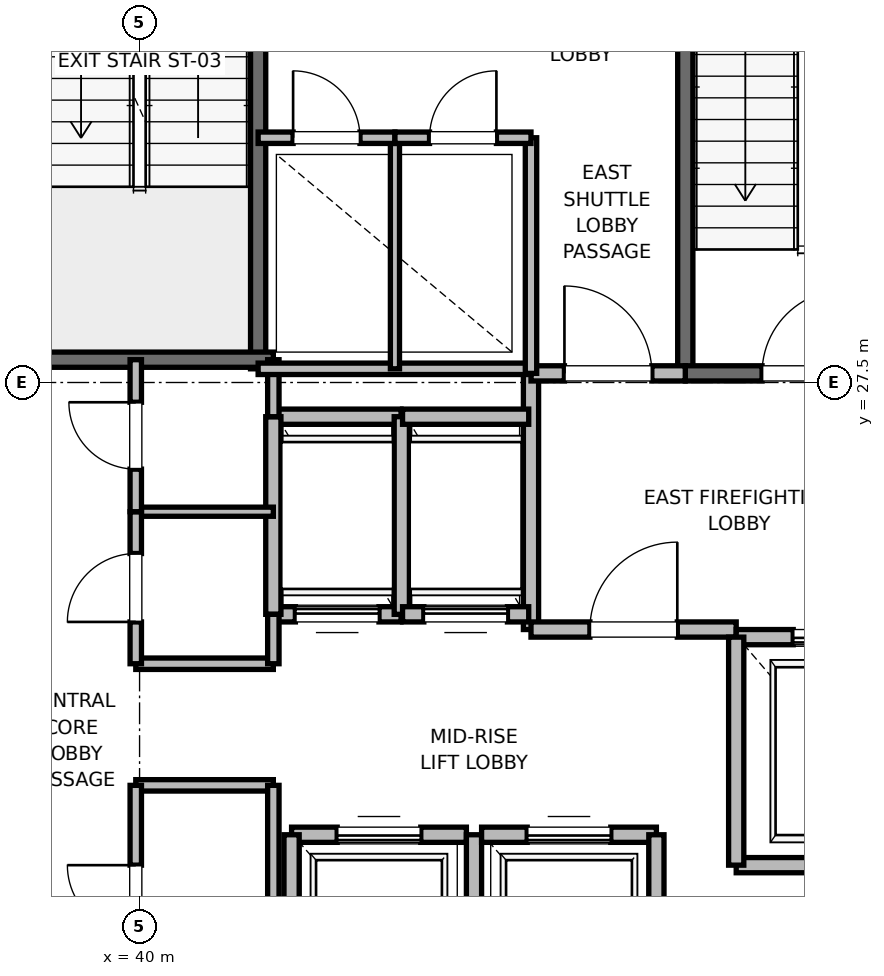
"""IFC4 building model, lengths in metres.
Left out: names, types, materials, properties, quantities, classifications, styles, units other than length and angle.
Written with IfcOpenShell. Run it as: python <this file> out.ifc"""

import sys

from ifc_helpers import new_model, si_unit, direction, frame, frame_2d, origin, place, context, subcontext, project, spatial, rectangle, extrude, element, fill, save


model = new_model("IFC4")
c1 = context("Model", 3, precision=1e-05, world=origin(), true_north=direction((0.0, 1.0)))
c2 = subcontext(c1, "Body", "Model", "MODEL_VIEW")
j1 = project(units=[si_unit("LENGTHUNIT", "METRE"), si_unit("PLANEANGLEUNIT", "RADIAN")], contexts=[c1])
p1 = place(None, origin())
s1 = spatial("IfcSite", under=j1, at=p1, CompositionType="ELEMENT")
p2 = place(p1, origin())
s2 = spatial("IfcBuilding", under=s1, at=p2, CompositionType="ELEMENT")
p3 = place(p2, frame((0.0, 0.0, 189.4)))
s3 = spatial("IfcBuildingStorey", under=s2, at=p3, CompositionType="ELEMENT", Elevation=189.4)
p4 = place(p3, frame((47.18, 27.62, 0.0), z_axis=(0.0, 0.0, 1.0), x_axis=(0.0, 1.0, 0.0)))
e1 = element("IfcWall", 1, at=p4, inside=s3, PredefinedType="SOLIDWALL", context=c2, shape_type="SweptSolid", body=[
    extrude(rectangle(XDim=8.18, YDim=0.2, at=frame_2d((4.09, 0.0))), origin(), (0.0, 0.0, 1.0), 5.1),
])
p5 = place(p3, frame((47.18, 27.62, 0.0), z_axis=(0.0, 0.0, 1.0), x_axis=(1.0, 0.0, 0.0)))
e2 = element("IfcWall", 2, at=p5, inside=s3, PredefinedType="SOLIDWALL", context=c2, shape_type="SweptSolid", body=[
    extrude(rectangle(XDim=3.12, YDim=0.2, at=frame_2d((1.56, 0.0))), origin(), (0.0, 0.0, 1.0), 5.1),
])
p6 = place(p5, frame((1.01, 0.0, 0.0)))
e3 = element("IfcOpeningElement", 3, at=p6, cuts=e2, PredefinedType="OPENING", context=c2, shape_type="SweptSolid", body=[
    extrude(rectangle(XDim=1.1, YDim=2.15, at=frame_2d((0.55, 1.075))), frame((0.0, 0.1, 0.0), z_axis=(0.0, -1.0, 0.0), x_axis=(1.0, 0.0, 0.0)), (0.0, 0.0, 1.0), 0.2),
])
p7 = place(p3, frame((41.56, 27.68, 0.0), z_axis=(0.0, 0.0, 1.0), x_axis=(0.0, 1.0, 0.0)))
e4 = element("IfcWall", 4, at=p7, inside=s3, PredefinedType="SOLIDWALL", context=c2, shape_type="SweptSolid", body=[
    extrude(rectangle(XDim=8.57, YDim=0.2, at=frame_2d((4.285, 0.0))), origin(), (0.0, 0.0, 1.0), 5.1),
])
p8 = place(p3, frame((38.44, 27.8, 0.0), z_axis=(0.0, 0.0, 1.0), x_axis=(1.0, 0.0, 0.0)))
e5 = element("IfcWall", 5, at=p8, inside=s3, PredefinedType="SOLIDWALL", context=c2, shape_type="SweptSolid", body=[
    extrude(rectangle(XDim=3.32, YDim=0.2, at=frame_2d((1.66, 0.0))), origin(), (0.0, 0.0, 1.0), 5.1),
])
p9 = place(p3, frame((45.15, 24.25, 0.0), z_axis=(0.0, 0.0, 1.0), x_axis=(0.0, 1.0, 0.0)))
e6 = element("IfcWall", 6, at=p9, inside=s3, PredefinedType="PARTITIONING", context=c2, shape_type="SweptSolid", body=[
    extrude(rectangle(XDim=3.37, YDim=0.2, at=frame_2d((1.685, 0.0))), origin(), (0.0, 0.0, 1.0), 5.1),
])
p10 = place(p3, frame((45.15, 24.25, 0.0), z_axis=(0.0, 0.0, 1.0), x_axis=(1.0, 0.0, 0.0)))
e7 = element("IfcWall", 7, at=p10, inside=s3, PredefinedType="PARTITIONING", context=c2, shape_type="SweptSolid", body=[
    extrude(rectangle(XDim=2.7, YDim=0.2, at=frame_2d((1.35, 0.0))), origin(), (0.0, 0.0, 1.0), 5.1),
])
p11 = place(p10, frame((0.775, 0.0, 0.0)))
e8 = element("IfcOpeningElement", 8, at=p11, cuts=e7, PredefinedType="OPENING", context=c2, shape_type="SweptSolid", body=[
    extrude(rectangle(XDim=1.15, YDim=2.2, at=frame_2d((0.575, 1.1))), frame((0.0, 0.1, 0.0), z_axis=(0.0, -1.0, 0.0), x_axis=(1.0, 0.0, 0.0)), (0.0, 0.0, 1.0), 0.2),
])
p12 = place(p3, frame((45.15, 27.62, 0.0), z_axis=(0.0, 0.0, 1.0), x_axis=(1.0, 0.0, 0.0)))
e9 = element("IfcWall", 9, at=p12, inside=s3, PredefinedType="PARTITIONING", context=c2, shape_type="SweptSolid", body=[
    extrude(rectangle(XDim=2.03, YDim=0.2, at=frame_2d((1.015, 0.0))), origin(), (0.0, 0.0, 1.0), 5.1),
])
p13 = place(p12, frame((0.44, 0.0, 0.0)))
e10 = element("IfcOpeningElement", 10, at=p13, cuts=e9, PredefinedType="OPENING", context=c2, shape_type="SweptSolid", body=[
    extrude(rectangle(XDim=1.15, YDim=2.2, at=frame_2d((0.575, 1.1))), frame((0.0, 0.1, 0.0), z_axis=(0.0, -1.0, 0.0), x_axis=(1.0, 0.0, 0.0)), (0.0, 0.0, 1.0), 0.2),
])
p14 = place(p3, frame((47.85, 21.15, 0.0), z_axis=(0.0, 0.0, 1.0), x_axis=(1.0, 0.0, 0.0)))
e11 = element("IfcWall", 11, at=p14, inside=s3, PredefinedType="SOLIDWALL", context=c2, shape_type="SweptSolid", body=[
    extrude(rectangle(XDim=2.6, YDim=0.2, at=frame_2d((1.3, 0.0))), origin(), (0.0, 0.0, 1.0), 5.1),
])
p15 = place(p3, frame((50.45, 24.15, 0.0), z_axis=(0.0, 0.0, 1.0), x_axis=(-1.0, 0.0, 0.0)))
e12 = element("IfcWall", 12, at=p15, inside=s3, PredefinedType="SOLIDWALL", context=c2, shape_type="SweptSolid", body=[
    extrude(rectangle(XDim=2.6, YDim=0.2, at=frame_2d((1.3, 0.0))), origin(), (0.0, 0.0, 1.0), 4.08),
])
p16 = place(p15, frame((0.75, 0.0, 0.0)))
e13 = element("IfcOpeningElement", 13, at=p16, cuts=e12, PredefinedType="OPENING", context=c2, shape_type="SweptSolid", body=[
    extrude(rectangle(XDim=1.1, YDim=2.2, at=frame_2d((0.55, 1.1))), frame((0.0, 0.1, 0.0), z_axis=(0.0, -1.0, 0.0), x_axis=(1.0, 0.0, 0.0)), (0.0, 0.0, 1.0), 0.2),
])
p17 = place(p3, frame((47.85, 24.15, 0.0), z_axis=(0.0, 0.0, 1.0), x_axis=(0.0, -1.0, 0.0)))
e14 = element("IfcWall", 14, at=p17, inside=s3, PredefinedType="SOLIDWALL", context=c2, shape_type="SweptSolid", body=[
    extrude(rectangle(XDim=3.0, YDim=0.2, at=frame_2d((1.5, 0.0))), origin(), (0.0, 0.0, 1.0), 5.1),
])
p18 = place(p3, frame((44.3, 21.55, 0.0), z_axis=(0.0, 0.0, 1.0), x_axis=(-1.0, 0.0, 0.0)))
e15 = element("IfcWall", 15, at=p18, inside=s3, PredefinedType="SOLIDWALL", context=c2, shape_type="SweptSolid", body=[
    extrude(rectangle(XDim=2.3, YDim=0.2, at=frame_2d((1.15, 0.0))), origin(), (0.0, 0.0, 1.0), 5.1),
])
p19 = place(p18, frame((0.6, 0.0, 0.0)))
e16 = element("IfcOpeningElement", 16, at=p19, cuts=e15, PredefinedType="OPENING", context=c2, shape_type="SweptSolid", body=[
    extrude(rectangle(XDim=1.1, YDim=2.2, at=frame_2d((0.55, 1.1))), frame((0.0, 0.1, 0.0), z_axis=(0.0, -1.0, 0.0), x_axis=(1.0, 0.0, 0.0)), (0.0, 0.0, 1.0), 0.2),
])
p20 = place(p3, frame((42.0, 21.55, 0.0), z_axis=(0.0, 0.0, 1.0), x_axis=(0.0, -1.0, 0.0)))
e17 = element("IfcWall", 17, at=p20, inside=s3, PredefinedType="SOLIDWALL", context=c2, shape_type="SweptSolid", body=[
    extrude(rectangle(XDim=2.6, YDim=0.2, at=frame_2d((1.3, 0.0))), origin(), (0.0, 0.0, 1.0), 4.08),
])
p21 = place(p3, frame((44.4, 18.95, 0.0), z_axis=(0.0, 0.0, 1.0), x_axis=(0.0, 1.0, 0.0)))
e18 = element("IfcWall", 18, at=p21, inside=s3, PredefinedType="SOLIDWALL", context=c2, shape_type="SweptSolid", body=[
    extrude(rectangle(XDim=2.6, YDim=0.2, at=frame_2d((1.3, 0.0))), origin(), (0.0, 0.0, 1.0), 5.1),
])
p22 = place(p3, frame((46.8, 21.55, 0.0), z_axis=(0.0, 0.0, 1.0), x_axis=(-1.0, 0.0, 0.0)))
e19 = element("IfcWall", 19, at=p22, inside=s3, PredefinedType="SOLIDWALL", context=c2, shape_type="SweptSolid", body=[
    extrude(rectangle(XDim=2.3, YDim=0.2, at=frame_2d((1.15, 0.0))), origin(), (0.0, 0.0, 1.0), 5.1),
])
p23 = place(p22, frame((0.6, 0.0, 0.0)))
e20 = element("IfcOpeningElement", 20, at=p23, cuts=e19, PredefinedType="OPENING", context=c2, shape_type="SweptSolid", body=[
    extrude(rectangle(XDim=1.1, YDim=2.2, at=frame_2d((0.55, 1.1))), frame((0.0, 0.1, 0.0), z_axis=(0.0, -1.0, 0.0), x_axis=(1.0, 0.0, 0.0)), (0.0, 0.0, 1.0), 0.2),
])
p24 = place(p3, frame((46.8, 18.95, 0.0), z_axis=(0.0, 0.0, 1.0), x_axis=(0.0, 1.0, 0.0)))
e21 = element("IfcWall", 21, at=p24, inside=s3, PredefinedType="SOLIDWALL", context=c2, shape_type="SweptSolid", body=[
    extrude(rectangle(XDim=2.6, YDim=0.2, at=frame_2d((1.3, 0.0))), origin(), (0.0, 0.0, 1.0), 5.1),
])
p25 = place(p3, frame((41.76, 24.45, 0.0), z_axis=(0.0, 0.0, 1.0), x_axis=(1.0, 0.0, 0.0)))
e22 = element("IfcWall", 22, at=p25, inside=s3, PredefinedType="SOLIDWALL", context=c2, shape_type="SweptSolid", body=[
    extrude(rectangle(XDim=1.68, YDim=0.2, at=frame_2d((0.84, 0.0))), origin(), (0.0, 0.0, 1.0), 5.1),
])
p26 = place(p25, frame((0.29, 0.0, 0.0)))
e23 = element("IfcOpeningElement", 23, at=p26, cuts=e22, PredefinedType="OPENING", context=c2, shape_type="SweptSolid", body=[
    extrude(rectangle(XDim=1.1, YDim=2.2, at=frame_2d((0.55, 1.1))), frame((0.0, 0.1, 0.0), z_axis=(0.0, -1.0, 0.0), x_axis=(1.0, 0.0, 0.0)), (0.0, 0.0, 1.0), 0.2),
])
p27 = place(p3, frame((43.44, 27.05, 0.0), z_axis=(0.0, 0.0, 1.0), x_axis=(-1.0, 0.0, 0.0)))
e24 = element("IfcWall", 24, at=p27, inside=s3, PredefinedType="SOLIDWALL", context=c2, shape_type="SweptSolid", body=[
    extrude(rectangle(XDim=1.68, YDim=0.2, at=frame_2d((0.84, 0.0))), origin(), (0.0, 0.0, 1.0), 5.1),
])
for number, where, z_axis, x_axis in (
    (25, (41.76, 27.05, 0.0), (0.0, 0.0, 1.0), (0.0, -1.0, 0.0)),
    (26, (43.45, 24.45, 0.0), (0.0, 0.0, 1.0), (0.0, 1.0, 0.0)),
):
    element("IfcWall", number, at=place(p3, frame(where, z_axis=z_axis, x_axis=x_axis)), inside=s3, PredefinedType="SOLIDWALL", context=c2, shape_type="SweptSolid", body=[
        extrude(rectangle(XDim=2.6, YDim=0.2, at=frame_2d((1.3, 0.0))), origin(), (0.0, 0.0, 1.0), 5.1),
    ])
p28 = place(p3, frame((43.46, 24.45, 0.0), z_axis=(0.0, 0.0, 1.0), x_axis=(1.0, 0.0, 0.0)))
e27 = element("IfcWall", 27, at=p28, inside=s3, PredefinedType="SOLIDWALL", context=c2, shape_type="SweptSolid", body=[
    extrude(rectangle(XDim=1.66, YDim=0.2, at=frame_2d((0.83, 0.0))), origin(), (0.0, 0.0, 1.0), 5.1),
])
p29 = place(p28, frame((0.28, 0.0, 0.0)))
e28 = element("IfcOpeningElement", 28, at=p29, cuts=e27, PredefinedType="OPENING", context=c2, shape_type="SweptSolid", body=[
    extrude(rectangle(XDim=1.1, YDim=2.2, at=frame_2d((0.55, 1.1))), frame((0.0, 0.1, 0.0), z_axis=(0.0, -1.0, 0.0), x_axis=(1.0, 0.0, 0.0)), (0.0, 0.0, 1.0), 0.2),
])
p30 = place(p3, frame((45.12, 27.05, 0.0), z_axis=(0.0, 0.0, 1.0), x_axis=(-1.0, 0.0, 0.0)))
e29 = element("IfcWall", 29, at=p30, inside=s3, PredefinedType="SOLIDWALL", context=c2, shape_type="SweptSolid", body=[
    extrude(rectangle(XDim=1.66, YDim=0.2, at=frame_2d((0.83, 0.0))), origin(), (0.0, 0.0, 1.0), 5.1),
])
for number, where, z_axis, x_axis in (
    (30, (39.95, 22.2, 0.0), (0.0, 0.0, 1.0), (1.0, 0.0, 0.0)),
    (31, (39.95, 23.8, 0.0), (0.0, 0.0, 1.0), (1.0, 0.0, 0.0)),
):
    element("IfcWall", number, at=place(p3, frame(where, z_axis=z_axis, x_axis=x_axis)), inside=s3, PredefinedType="PARTITIONING", context=c2, shape_type="SweptSolid", body=[
        extrude(rectangle(XDim=1.81, YDim=0.15, at=frame_2d((0.905, 0.0))), origin(), (0.0, 0.0, 1.0), 2.85),
    ])
p31 = place(p3, frame((39.95, 25.8, 0.0), z_axis=(0.0, 0.0, 1.0), x_axis=(1.0, 0.0, 0.0)))
e32 = element("IfcWall", 32, at=p31, inside=s3, PredefinedType="PARTITIONING", context=c2, shape_type="SweptSolid", body=[
    extrude(rectangle(XDim=1.81, YDim=0.12, at=frame_2d((0.905, 0.0))), origin(), (0.0, 0.0, 1.0), 2.85),
])
p32 = place(p3, frame((41.76, 18.6, 0.0), z_axis=(0.0, 0.0, 1.0), x_axis=(0.0, 1.0, 0.0)))
e33 = element("IfcWall", 33, at=p32, inside=s3, PredefinedType="PARTITIONING", context=c2, shape_type="SweptSolid", body=[
    extrude(rectangle(XDim=3.6, YDim=0.15, at=frame_2d((1.8, 0.0))), origin(), (0.0, 0.0, 1.0), 2.85),
])
p33 = place(p3, frame((41.76, 23.8, 0.0), z_axis=(0.0, 0.0, 1.0), x_axis=(0.0, 1.0, 0.0)))
e34 = element("IfcWall", 34, at=p33, inside=s3, PredefinedType="PARTITIONING", context=c2, shape_type="SweptSolid", body=[
    extrude(rectangle(XDim=0.65, YDim=0.15, at=frame_2d((0.325, 0.0))), origin(), (0.0, 0.0, 1.0), 2.85),
])
p34 = place(p3, frame((41.76, 27.05, 0.0), z_axis=(0.0, 0.0, 1.0), x_axis=(0.0, 1.0, 0.0)))
e35 = element("IfcWall", 35, at=p34, inside=s3, PredefinedType="PARTITIONING", context=c2, shape_type="SweptSolid", body=[
    extrude(rectangle(XDim=0.75, YDim=0.15, at=frame_2d((0.375, 0.0))), origin(), (0.0, 0.0, 1.0), 2.85),
])
p35 = place(p3, frame((39.95, 19.2, 0.0), z_axis=(0.0, 0.0, 1.0), x_axis=(0.0, 1.0, 0.0)))
e36 = element("IfcWall", 36, at=p35, inside=s3, PredefinedType="PARTITIONING", context=c2, shape_type="SweptSolid", body=[
    extrude(rectangle(XDim=3.0, YDim=0.15, at=frame_2d((1.5, 0.0))), origin(), (0.0, 0.0, 1.0), 2.85),
])
p36 = place(p35, frame((1.05, 0.0, 0.0)))
e37 = element("IfcOpeningElement", 37, at=p36, cuts=e36, PredefinedType="OPENING", context=c2, shape_type="SweptSolid", body=[
    extrude(rectangle(XDim=0.9, YDim=2.1, at=frame_2d((0.45, 1.05))), frame((0.0, 0.075, 0.0), z_axis=(0.0, -1.0, 0.0), x_axis=(1.0, 0.0, 0.0)), (0.0, 0.0, 1.0), 0.15),
])
p37 = place(p3, frame((39.95, 23.8, 0.0), z_axis=(0.0, 0.0, 1.0), x_axis=(0.0, 1.0, 0.0)))
e38 = element("IfcWall", 38, at=p37, inside=s3, PredefinedType="PARTITIONING", context=c2, shape_type="SweptSolid", body=[
    extrude(rectangle(XDim=2.0, YDim=0.15, at=frame_2d((1.0, 0.0))), origin(), (0.0, 0.0, 1.0), 2.85),
])
p38 = place(p37, frame((0.55, 0.0, 0.0)))
e39 = element("IfcOpeningElement", 39, at=p38, cuts=e38, PredefinedType="OPENING", context=c2, shape_type="SweptSolid", body=[
    extrude(rectangle(XDim=0.9, YDim=2.1, at=frame_2d((0.45, 1.05))), frame((0.0, 0.075, 0.0), z_axis=(0.0, -1.0, 0.0), x_axis=(1.0, 0.0, 0.0)), (0.0, 0.0, 1.0), 0.15),
])
p39 = place(p3, frame((39.95, 25.8, 0.0), z_axis=(0.0, 0.0, 1.0), x_axis=(0.0, 1.0, 0.0)))
e40 = element("IfcWall", 40, at=p39, inside=s3, PredefinedType="PARTITIONING", context=c2, shape_type="SweptSolid", body=[
    extrude(rectangle(XDim=2.0, YDim=0.15, at=frame_2d((1.0, 0.0))), origin(), (0.0, 0.0, 1.0), 2.85),
])
p40 = place(p39, frame((0.56, 0.0, 0.0)))
e41 = element("IfcOpeningElement", 41, at=p40, cuts=e40, PredefinedType="OPENING", context=c2, shape_type="SweptSolid", body=[
    extrude(rectangle(XDim=0.88, YDim=2.1, at=frame_2d((0.44, 1.05))), frame((0.0, 0.075, 0.0), z_axis=(0.0, -1.0, 0.0), x_axis=(1.0, 0.0, 0.0)), (0.0, 0.0, 1.0), 0.15),
])
p41 = place(p3, frame((41.56, 27.68, 0.0), z_axis=(0.0, 0.0, 1.0), x_axis=(1.0, 0.0, 0.0)))
e42 = element("IfcWall", 42, at=p41, inside=s3, PredefinedType="PARTITIONING", context=c2, shape_type="SweptSolid", body=[
    extrude(rectangle(XDim=3.59, YDim=0.15, at=frame_2d((1.795, 0.0))), origin(), (0.0, 0.0, 1.0), 2.85),
])
p42 = place(p3, frame((45.15, 27.62, 0.0), z_axis=(0.0, 0.0, 1.0), x_axis=(0.0, 1.0, 0.0)))
e43 = element("IfcWall", 43, at=p42, inside=s3, PredefinedType="PARTITIONING", context=c2, shape_type="SweptSolid", body=[
    extrude(rectangle(XDim=3.1, YDim=0.15, at=frame_2d((1.55, 0.0))), origin(), (0.0, 0.0, 1.0), 2.85),
])
p43 = place(p3, frame((43.36, 27.68, 0.0), z_axis=(0.0, 0.0, 1.0), x_axis=(0.0, 1.0, 0.0)))
e44 = element("IfcWall", 44, at=p43, inside=s3, PredefinedType="PARTITIONING", context=c2, shape_type="SweptSolid", body=[
    extrude(rectangle(XDim=3.04, YDim=0.12, at=frame_2d((1.52, 0.0))), origin(), (0.0, 0.0, 1.0), 2.85),
])
p44 = place(p3, frame((41.56, 30.72, 0.0), z_axis=(0.0, 0.0, 1.0), x_axis=(1.0, 0.0, 0.0)))
e45 = element("IfcWall", 45, at=p44, inside=s3, PredefinedType="PARTITIONING", context=c2, shape_type="SweptSolid", body=[
    extrude(rectangle(XDim=1.8, YDim=0.15, at=frame_2d((0.9, 0.0))), origin(), (0.0, 0.0, 1.0), 2.85),
])
p45 = place(p44, frame((0.46, 0.0, 0.0)))
e46 = element("IfcOpeningElement", 46, at=p45, cuts=e45, PredefinedType="OPENING", context=c2, shape_type="SweptSolid", body=[
    extrude(rectangle(XDim=0.88, YDim=2.1, at=frame_2d((0.44, 1.05))), frame((0.0, 0.075, 0.0), z_axis=(0.0, -1.0, 0.0), x_axis=(1.0, 0.0, 0.0)), (0.0, 0.0, 1.0), 0.15),
])
p46 = place(p3, frame((43.36, 30.72, 0.0), z_axis=(0.0, 0.0, 1.0), x_axis=(1.0, 0.0, 0.0)))
e47 = element("IfcWall", 47, at=p46, inside=s3, PredefinedType="PARTITIONING", context=c2, shape_type="SweptSolid", body=[
    extrude(rectangle(XDim=1.79, YDim=0.15, at=frame_2d((0.895, 0.0))), origin(), (0.0, 0.0, 1.0), 2.85),
])
p47 = place(p46, frame((0.455, 0.0, 0.0)))
e48 = element("IfcOpeningElement", 48, at=p47, cuts=e47, PredefinedType="OPENING", context=c2, shape_type="SweptSolid", body=[
    extrude(rectangle(XDim=0.88, YDim=2.1, at=frame_2d((0.44, 1.05))), frame((0.0, 0.075, 0.0), z_axis=(0.0, -1.0, 0.0), x_axis=(1.0, 0.0, 0.0)), (0.0, 0.0, 1.0), 0.15),
])
p48 = place(p6, origin())
e49 = element("IfcDoor", 49, at=p48, inside=s3, OperationType="SINGLE_SWING_RIGHT", PredefinedType="DOOR", context=c2, shape_type="SweptSolid", body=[
    extrude(rectangle(XDim=1.1, YDim=2.15, at=frame_2d((0.55, 1.075))), frame((0.0, 0.025, 0.0), z_axis=(0.0, -1.0, 0.0), x_axis=(1.0, 0.0, 0.0)), (0.0, 0.0, 1.0), 0.05),
])
fill(e3, e49)
p49 = place(p11, origin())
e50 = element("IfcDoor", 50, at=p49, inside=s3, OperationType="SINGLE_SWING_RIGHT", PredefinedType="DOOR", context=c2, shape_type="SweptSolid", body=[
    extrude(rectangle(XDim=1.15, YDim=2.2, at=frame_2d((0.575, 1.1))), frame((0.0, 0.025, 0.0), z_axis=(0.0, -1.0, 0.0), x_axis=(1.0, 0.0, 0.0)), (0.0, 0.0, 1.0), 0.05),
])
fill(e8, e50)
p50 = place(p13, origin())
e51 = element("IfcDoor", 51, at=p50, inside=s3, OperationType="SINGLE_SWING_LEFT", PredefinedType="DOOR", context=c2, shape_type="SweptSolid", body=[
    extrude(rectangle(XDim=1.15, YDim=2.2, at=frame_2d((0.575, 1.1))), frame((0.0, 0.025, 0.0), z_axis=(0.0, -1.0, 0.0), x_axis=(1.0, 0.0, 0.0)), (0.0, 0.0, 1.0), 0.05),
])
fill(e10, e51)
p51 = place(p16, origin())
e52 = element("IfcDoor", 52, at=p51, inside=s3, OperationType="SLIDING_TO_RIGHT", PredefinedType="DOOR", context=c2, shape_type="SweptSolid", body=[
    extrude(rectangle(XDim=1.1, YDim=2.2, at=frame_2d((0.55, 1.1))), frame((0.0, 0.025, 0.0), z_axis=(0.0, -1.0, 0.0), x_axis=(1.0, 0.0, 0.0)), (0.0, 0.0, 1.0), 0.05),
])
fill(e13, e52)
p52 = place(p19, origin())
e53 = element("IfcDoor", 53, at=p52, inside=s3, OperationType="SLIDING_TO_RIGHT", PredefinedType="DOOR", context=c2, shape_type="SweptSolid", body=[
    extrude(rectangle(XDim=1.1, YDim=2.2, at=frame_2d((0.55, 1.1))), frame((0.0, 0.025, 0.0), z_axis=(0.0, -1.0, 0.0), x_axis=(1.0, 0.0, 0.0)), (0.0, 0.0, 1.0), 0.05),
])
fill(e16, e53)
p53 = place(p23, origin())
e54 = element("IfcDoor", 54, at=p53, inside=s3, OperationType="SLIDING_TO_RIGHT", PredefinedType="DOOR", context=c2, shape_type="SweptSolid", body=[
    extrude(rectangle(XDim=1.1, YDim=2.2, at=frame_2d((0.55, 1.1))), frame((0.0, 0.025, 0.0), z_axis=(0.0, -1.0, 0.0), x_axis=(1.0, 0.0, 0.0)), (0.0, 0.0, 1.0), 0.05),
])
fill(e20, e54)
p54 = place(p26, origin())
e55 = element("IfcDoor", 55, at=p54, inside=s3, OperationType="SLIDING_TO_RIGHT", PredefinedType="DOOR", context=c2, shape_type="SweptSolid", body=[
    extrude(rectangle(XDim=1.1, YDim=2.2, at=frame_2d((0.55, 1.1))), frame((0.0, 0.025, 0.0), z_axis=(0.0, -1.0, 0.0), x_axis=(1.0, 0.0, 0.0)), (0.0, 0.0, 1.0), 0.05),
])
fill(e23, e55)
p55 = place(p29, origin())
e56 = element("IfcDoor", 56, at=p55, inside=s3, OperationType="SLIDING_TO_RIGHT", PredefinedType="DOOR", context=c2, shape_type="SweptSolid", body=[
    extrude(rectangle(XDim=1.1, YDim=2.2, at=frame_2d((0.55, 1.1))), frame((0.0, 0.025, 0.0), z_axis=(0.0, -1.0, 0.0), x_axis=(1.0, 0.0, 0.0)), (0.0, 0.0, 1.0), 0.05),
])
fill(e28, e56)
p56 = place(p36, origin())
e57 = element("IfcDoor", 57, at=p56, inside=s3, OperationType="SINGLE_SWING_RIGHT", PredefinedType="DOOR", context=c2, shape_type="SweptSolid", body=[
    extrude(rectangle(XDim=0.9, YDim=2.1, at=frame_2d((0.45, 1.05))), frame((0.0, 0.025, 0.0), z_axis=(0.0, -1.0, 0.0), x_axis=(1.0, 0.0, 0.0)), (0.0, 0.0, 1.0), 0.05),
])
fill(e37, e57)
p57 = place(p38, origin())
e58 = element("IfcDoor", 58, at=p57, inside=s3, OperationType="SINGLE_SWING_LEFT", PredefinedType="DOOR", context=c2, shape_type="SweptSolid", body=[
    extrude(rectangle(XDim=0.9, YDim=2.1, at=frame_2d((0.45, 1.05))), frame((0.0, 0.025, 0.0), z_axis=(0.0, -1.0, 0.0), x_axis=(1.0, 0.0, 0.0)), (0.0, 0.0, 1.0), 0.05),
])
fill(e39, e58)
p58 = place(p40, origin())
e59 = element("IfcDoor", 59, at=p58, inside=s3, OperationType="SINGLE_SWING_RIGHT", PredefinedType="DOOR", context=c2, shape_type="SweptSolid", body=[
    extrude(rectangle(XDim=0.88, YDim=2.1, at=frame_2d((0.44, 1.05))), frame((0.0, 0.025, 0.0), z_axis=(0.0, -1.0, 0.0), x_axis=(1.0, 0.0, 0.0)), (0.0, 0.0, 1.0), 0.05),
])
fill(e41, e59)
p59 = place(p45, origin())
e60 = element("IfcDoor", 60, at=p59, inside=s3, OperationType="SINGLE_SWING_LEFT", PredefinedType="DOOR", context=c2, shape_type="SweptSolid", body=[
    extrude(rectangle(XDim=0.88, YDim=2.1, at=frame_2d((0.44, 1.05))), frame((0.0, 0.025, 0.0), z_axis=(0.0, -1.0, 0.0), x_axis=(1.0, 0.0, 0.0)), (0.0, 0.0, 1.0), 0.05),
])
fill(e46, e60)
p60 = place(p47, origin())
e61 = element("IfcDoor", 61, at=p60, inside=s3, OperationType="SINGLE_SWING_RIGHT", PredefinedType="DOOR", context=c2, shape_type="SweptSolid", body=[
    extrude(rectangle(XDim=0.88, YDim=2.1, at=frame_2d((0.44, 1.05))), frame((0.0, 0.025, 0.0), z_axis=(0.0, -1.0, 0.0), x_axis=(1.0, 0.0, 0.0)), (0.0, 0.0, 1.0), 0.05),
])
fill(e48, e61)
save(model, sys.argv[1])
